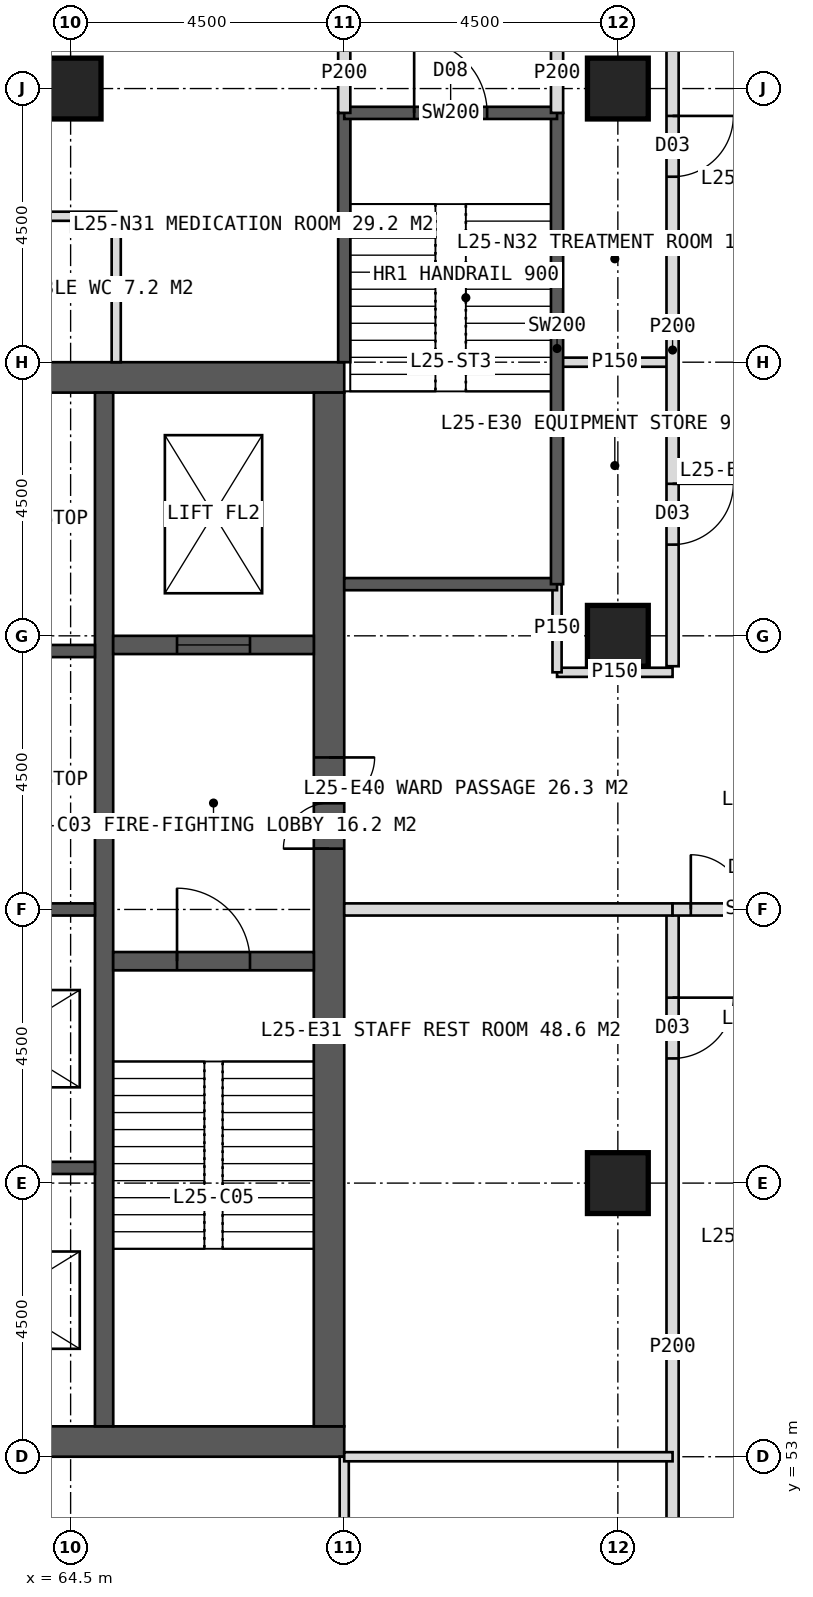
"""IFC4 building model, lengths in metres.
Left out: names, types, materials, properties, quantities, classifications, styles, units other than length and angle.
Written with IfcOpenShell. Run it as: python <this file> out.ifc"""

import sys

from ifc_helpers import new_model, si_unit, direction, frame, frame_2d, origin, origin_2d, place, context, subcontext, project, spatial, rectangle, hollow_rectangle, extrude, element, fill, save


model = new_model("IFC4")
c1 = context("Model", 3, precision=1e-05, world=origin(), true_north=direction((0.0, 1.0)))
c2 = subcontext(c1, "Body", "Model", "MODEL_VIEW")
j1 = project(units=[si_unit("LENGTHUNIT", "METRE"), si_unit("PLANEANGLEUNIT", "RADIAN")], contexts=[c1])
p1 = place(None, origin())
s1 = spatial("IfcSite", under=j1, at=p1, CompositionType="ELEMENT")
p2 = place(p1, origin())
s2 = spatial("IfcBuilding", under=s1, at=p2, CompositionType="ELEMENT")
p3 = place(p2, frame((0.0, 0.0, 108.0)))
s3 = spatial("IfcBuildingStorey", under=s2, at=p3, CompositionType="ELEMENT", Elevation=108.0)
p4 = place(p3, frame((51.0, 70.75, 0.0), z_axis=(0.0, 0.0, 1.0), x_axis=(1.0, 0.0, 0.0)))
e1 = element("IfcWall", 1, at=p4, inside=s3, PredefinedType="SHEAR", context=c2, shape_type="SweptSolid", body=[
    extrude(rectangle(XDim=18.0, YDim=0.5, at=frame_2d((9.0, 0.0))), origin(), (0.0, 0.0, 1.0), 4.0),
])
p5 = place(p4, frame((8.1, 0.0, 0.0)))
e2 = element("IfcOpeningElement", 2, at=p5, cuts=e1, PredefinedType="OPENING", context=c2, shape_type="SweptSolid", body=[
    extrude(rectangle(XDim=1.8, YDim=2.2, at=frame_2d((0.9, 1.1))), frame((0.0, 0.26, 0.0), z_axis=(0.0, -1.0, 0.0), x_axis=(1.0, 0.0, 0.0)), (0.0, 0.0, 1.0), 0.52),
])
p6 = place(p3, frame((51.0, 53.25, 0.0), z_axis=(0.0, 0.0, 1.0), x_axis=(1.0, 0.0, 0.0)))
e3 = element("IfcWall", 3, at=p6, inside=s3, PredefinedType="SHEAR", context=c2, shape_type="SweptSolid", body=[
    extrude(rectangle(XDim=18.0, YDim=0.5, at=frame_2d((9.0, 0.0))), origin(), (0.0, 0.0, 1.0), 4.0),
])
p7 = place(p6, frame((8.1, 0.0, 0.0)))
e4 = element("IfcOpeningElement", 4, at=p7, cuts=e3, PredefinedType="OPENING", context=c2, shape_type="SweptSolid", body=[
    extrude(rectangle(XDim=1.8, YDim=2.2, at=frame_2d((0.9, 1.1))), frame((0.0, 0.26, 0.0), z_axis=(0.0, -1.0, 0.0), x_axis=(1.0, 0.0, 0.0)), (0.0, 0.0, 1.0), 0.52),
])
p8 = place(p3, frame((68.75, 53.5, 0.0), z_axis=(0.0, 0.0, 1.0), x_axis=(0.0, 1.0, 0.0)))
e5 = element("IfcWall", 5, at=p8, inside=s3, PredefinedType="SHEAR", context=c2, shape_type="SweptSolid", body=[
    extrude(rectangle(XDim=17.0, YDim=0.5, at=frame_2d((8.5, 0.0))), origin(), (0.0, 0.0, 1.0), 4.0),
])
p9 = place(p8, frame((9.5, 0.0, 0.0)))
e6 = element("IfcOpeningElement", 6, at=p9, cuts=e5, PredefinedType="OPENING", context=c2, shape_type="SweptSolid", body=[
    extrude(rectangle(XDim=1.5, YDim=2.2, at=frame_2d((0.75, 1.1))), frame((0.0, 0.26, 0.0), z_axis=(0.0, -1.0, 0.0), x_axis=(1.0, 0.0, 0.0)), (0.0, 0.0, 1.0), 0.52),
])
p10 = place(p3, frame((65.05, 53.5, 0.0), z_axis=(0.0, 0.0, 1.0), x_axis=(0.0, 1.0, 0.0)))
e7 = element("IfcWall", 7, at=p10, inside=s3, PredefinedType="SHEAR", context=c2, shape_type="SweptSolid", body=[
    extrude(rectangle(XDim=17.0, YDim=0.3, at=frame_2d((8.5, 0.0))), origin(), (0.0, 0.0, 1.0), 4.0),
])
for number, where, z_axis, x_axis in (
    (8, (61.85, 57.75, 0.0), (0.0, 0.0, 1.0), (1.0, 0.0, 0.0)),
    (9, (61.85, 62.0, 0.0), (0.0, 0.0, 1.0), (1.0, 0.0, 0.0)),
    (10, (61.85, 66.25, 0.0), (0.0, 0.0, 1.0), (1.0, 0.0, 0.0)),
):
    element("IfcWall", number, at=place(p3, frame(where, z_axis=z_axis, x_axis=x_axis)), inside=s3, PredefinedType="SHEAR", context=c2, shape_type="SweptSolid", body=[
        extrude(rectangle(XDim=3.05, YDim=0.2, at=frame_2d((1.525, 0.0))), origin(), (0.0, 0.0, 1.0), 4.0),
    ])
p11 = place(p3, frame((65.2, 61.15, 0.0), z_axis=(0.0, 0.0, 1.0), x_axis=(1.0, 0.0, 0.0)))
e11 = element("IfcWall", 11, at=p11, inside=s3, PredefinedType="SHEAR", context=c2, shape_type="SweptSolid", body=[
    extrude(rectangle(XDim=3.3, YDim=0.3, at=frame_2d((1.65, 0.0))), origin(), (0.0, 0.0, 1.0), 4.0),
])
p12 = place(p11, frame((1.05, 0.0, 0.0)))
e12 = element("IfcOpeningElement", 12, at=p12, cuts=e11, PredefinedType="OPENING", context=c2, shape_type="SweptSolid", body=[
    extrude(rectangle(XDim=1.2, YDim=2.1, at=frame_2d((0.6, 1.05))), frame((0.0, 0.16, 0.0), z_axis=(0.0, -1.0, 0.0), x_axis=(1.0, 0.0, 0.0)), (0.0, 0.0, 1.0), 0.32),
])
p13 = place(p3, frame((65.2, 66.35, 0.0), z_axis=(0.0, 0.0, 1.0), x_axis=(1.0, 0.0, 0.0)))
e13 = element("IfcWall", 13, at=p13, inside=s3, PredefinedType="SHEAR", context=c2, shape_type="SweptSolid", body=[
    extrude(rectangle(XDim=3.3, YDim=0.3, at=frame_2d((1.65, 0.0))), origin(), (0.0, 0.0, 1.0), 4.0),
])
p14 = place(p13, frame((1.05, 0.0, 0.0)))
e14 = element("IfcOpeningElement", 14, at=p14, cuts=e13, PredefinedType="OPENING", context=c2, shape_type="SweptSolid", body=[
    extrude(rectangle(XDim=1.2, YDim=2.2, at=frame_2d((0.6, 1.1))), frame((0.0, 0.16, 0.0), z_axis=(0.0, -1.0, 0.0), x_axis=(1.0, 0.0, 0.0)), (0.0, 0.0, 1.0), 0.32),
])
for number, where, z_axis, x_axis in (
    (15, (73.5, 75.5, 0.0), (0.0, 0.0, 1.0), (1.0, 0.0, 0.0)),
    (16, (64.5, 75.5, 0.0), (0.0, 0.0, 1.0), (1.0, 0.0, 0.0)),
    (17, (73.5, 57.5, 0.0), (0.0, 0.0, 1.0), (1.0, 0.0, 0.0)),
    (18, (73.5, 66.5, 0.0), (0.0, 0.0, 1.0), (1.0, 0.0, 0.0)),
):
    element("IfcColumn", number, at=place(p3, frame(where, z_axis=z_axis, x_axis=x_axis)), inside=s3, PredefinedType="COLUMN", context=c2, shape_type="SweptSolid", body=[
        extrude(hollow_rectangle(XDim=1.0, YDim=1.0, WallThickness=0.1, at=origin_2d()), origin(), (0.0, 0.0, 1.0), 4.0),
    ])
p15 = place(p3, frame((62.25, 73.4, 0.0), z_axis=(0.0, 0.0, 1.0), x_axis=(1.0, 0.0, 0.0)))
e19 = element("IfcWall", 19, at=p15, inside=s3, PredefinedType="PARTITIONING", context=c2, shape_type="SweptSolid", body=[
    extrude(rectangle(XDim=3.0, YDim=0.15, at=frame_2d((1.5, 0.0))), origin(), (0.0, 0.0, 1.0), 3.75),
])
p16 = place(p3, frame((65.25, 71.0, 0.0), z_axis=(0.0, 0.0, 1.0), x_axis=(0.0, 1.0, 0.0)))
e20 = element("IfcWall", 20, at=p16, inside=s3, PredefinedType="PARTITIONING", context=c2, shape_type="SweptSolid", body=[
    extrude(rectangle(XDim=2.4, YDim=0.15, at=frame_2d((1.2, 0.0))), origin(), (0.0, 0.0, 1.0), 3.75),
])
p17 = place(p3, frame((69.0, 53.0, 0.0), z_axis=(0.0, 0.0, 1.0), x_axis=(0.0, -1.0, 0.0)))
e21 = element("IfcWall", 21, at=p17, inside=s3, PredefinedType="PARTITIONING", context=c2, shape_type="SweptSolid", body=[
    extrude(rectangle(XDim=5.4, YDim=0.15, at=frame_2d((2.7, 0.0))), origin(), (0.0, 0.0, 1.0), 3.75),
])
p18 = place(p3, frame((72.5, 71.0, 0.0), z_axis=(0.0, 0.0, 1.0), x_axis=(1.0, 0.0, 0.0)))
e22 = element("IfcWall", 22, at=p18, inside=s3, PredefinedType="PARTITIONING", context=c2, shape_type="SweptSolid", body=[
    extrude(rectangle(XDim=1.9, YDim=0.15, at=frame_2d((0.95, 0.0))), origin(), (0.0, 0.0, 1.0), 3.75),
])
p19 = place(p3, frame((74.4, 76.4, 0.0), z_axis=(0.0, 0.0, 1.0), x_axis=(0.0, -1.0, 0.0)))
e23 = element("IfcWall", 23, at=p19, inside=s3, PredefinedType="PARTITIONING", context=c2, shape_type="SweptSolid", body=[
    extrude(rectangle(XDim=10.4, YDim=0.2, at=frame_2d((5.2, 0.0))), origin(), (0.0, 0.0, 1.0), 3.75),
])
p20 = place(p19, frame((1.35, 0.0, 0.0)))
e24 = element("IfcOpeningElement", 24, at=p20, cuts=e23, PredefinedType="OPENING", context=c2, shape_type="SweptSolid", body=[
    extrude(rectangle(XDim=1.0, YDim=2.1, at=frame_2d((0.5, 1.05))), frame((0.0, 0.11, 0.0), z_axis=(0.0, -1.0, 0.0), x_axis=(1.0, 0.0, 0.0)), (0.0, 0.0, 1.0), 0.22),
])
p21 = place(p19, frame((7.4, 0.0, 0.0)))
e25 = element("IfcOpeningElement", 25, at=p21, cuts=e23, PredefinedType="OPENING", context=c2, shape_type="SweptSolid", body=[
    extrude(rectangle(XDim=1.0, YDim=2.1, at=frame_2d((0.5, 1.05))), frame((0.0, 0.11, 0.0), z_axis=(0.0, -1.0, 0.0), x_axis=(1.0, 0.0, 0.0)), (0.0, 0.0, 1.0), 0.22),
])
p22 = place(p3, frame((74.4, 62.0, 0.0), z_axis=(0.0, 0.0, 1.0), x_axis=(0.0, -1.0, 0.0)))
e26 = element("IfcWall", 26, at=p22, inside=s3, PredefinedType="PARTITIONING", context=c2, shape_type="SweptSolid", body=[
    extrude(rectangle(XDim=14.4, YDim=0.2, at=frame_2d((7.2, 0.0))), origin(), (0.0, 0.0, 1.0), 3.75),
])
p23 = place(p22, frame((1.45, 0.0, 0.0)))
e27 = element("IfcOpeningElement", 27, at=p23, cuts=e26, PredefinedType="OPENING", context=c2, shape_type="SweptSolid", body=[
    extrude(rectangle(XDim=1.0, YDim=2.1, at=frame_2d((0.5, 1.05))), frame((0.0, 0.11, 0.0), z_axis=(0.0, -1.0, 0.0), x_axis=(1.0, 0.0, 0.0)), (0.0, 0.0, 1.0), 0.22),
])
p24 = place(p22, frame((11.2, 0.0, 0.0)))
e28 = element("IfcOpeningElement", 28, at=p24, cuts=e26, PredefinedType="OPENING", context=c2, shape_type="SweptSolid", body=[
    extrude(rectangle(XDim=1.0, YDim=2.1, at=frame_2d((0.5, 1.05))), frame((0.0, 0.11, 0.0), z_axis=(0.0, -1.0, 0.0), x_axis=(1.0, 0.0, 0.0)), (0.0, 0.0, 1.0), 0.22),
])
p25 = place(p3, frame((72.5, 65.9, 0.0), z_axis=(0.0, 0.0, 1.0), x_axis=(1.0, 0.0, 0.0)))
e29 = element("IfcWall", 29, at=p25, inside=s3, PredefinedType="PARTITIONING", context=c2, shape_type="SweptSolid", body=[
    extrude(rectangle(XDim=1.9, YDim=0.15, at=frame_2d((0.95, 0.0))), origin(), (0.0, 0.0, 1.0), 3.75),
])
p26 = place(p3, frame((69.0, 62.0, 0.0), z_axis=(0.0, 0.0, 1.0), x_axis=(1.0, 0.0, 0.0)))
e30 = element("IfcWall", 30, at=p26, inside=s3, PredefinedType="SOLIDWALL", context=c2, shape_type="SweptSolid", body=[
    extrude(rectangle(XDim=5.4, YDim=0.2, at=frame_2d((2.7, 0.0))), origin(), (0.0, 0.0, 1.0), 2.95),
])
p27 = place(p3, frame((69.0, 53.0, 0.0), z_axis=(0.0, 0.0, 1.0), x_axis=(1.0, 0.0, 0.0)))
e31 = element("IfcWall", 31, at=p27, inside=s3, PredefinedType="PARTITIONING", context=c2, shape_type="SweptSolid", body=[
    extrude(rectangle(XDim=5.4, YDim=0.15, at=frame_2d((2.7, 0.0))), origin(), (0.0, 0.0, 1.0), 3.75),
])
p28 = place(p3, frame((74.4, 62.0, 0.0), z_axis=(0.0, 0.0, 1.0), x_axis=(1.0, 0.0, 0.0)))
e32 = element("IfcWall", 32, at=p28, inside=s3, PredefinedType="SOLIDWALL", context=c2, shape_type="SweptSolid", body=[
    extrude(rectangle(XDim=2.7, YDim=0.2, at=frame_2d((1.35, 0.0))), origin(), (0.0, 0.0, 1.0), 2.95),
])
p29 = place(p28, frame((0.3, 0.0, 0.0)))
e33 = element("IfcOpeningElement", 33, at=p29, cuts=e32, PredefinedType="OPENING", context=c2, shape_type="SweptSolid", body=[
    extrude(rectangle(XDim=1.8, YDim=2.2, at=frame_2d((0.9, 1.1))), frame((0.0, 0.11, 0.0), z_axis=(0.0, -1.0, 0.0), x_axis=(1.0, 0.0, 0.0)), (0.0, 0.0, 1.0), 0.22),
])
p30 = place(p3, frame((72.5, 65.9, 0.0), z_axis=(0.0, 0.0, 1.0), x_axis=(0.0, 1.0, 0.0)))
e34 = element("IfcWall", 34, at=p30, inside=s3, PredefinedType="PARTITIONING", context=c2, shape_type="SweptSolid", body=[
    extrude(rectangle(XDim=1.45, YDim=0.15, at=frame_2d((0.725, 0.0))), origin(), (0.0, 0.0, 1.0), 3.75),
])
p31 = place(p3, frame((69.0, 71.0, 0.0), z_axis=(0.0, 0.0, 1.0), x_axis=(0.0, 1.0, 0.0)))
e35 = element("IfcWall", 35, at=p31, inside=s3, PredefinedType="SOLIDWALL", context=c2, shape_type="SweptSolid", body=[
    extrude(rectangle(XDim=4.1, YDim=0.2, at=frame_2d((2.05, 0.0))), origin(), (0.0, 0.0, 1.0), 3.75),
])
p32 = place(p3, frame((69.0, 67.35, 0.0), z_axis=(0.0, 0.0, 1.0), x_axis=(1.0, 0.0, 0.0)))
e36 = element("IfcWall", 36, at=p32, inside=s3, PredefinedType="SOLIDWALL", context=c2, shape_type="SweptSolid", body=[
    extrude(rectangle(XDim=3.5, YDim=0.2, at=frame_2d((1.75, 0.0))), origin(), (0.0, 0.0, 1.0), 3.75),
])
p33 = place(p3, frame((72.5, 67.35, 0.0), z_axis=(0.0, 0.0, 1.0), x_axis=(0.0, 1.0, 0.0)))
e37 = element("IfcWall", 37, at=p33, inside=s3, PredefinedType="SOLIDWALL", context=c2, shape_type="SweptSolid", body=[
    extrude(rectangle(XDim=7.75, YDim=0.2, at=frame_2d((3.875, 0.0))), origin(), (0.0, 0.0, 1.0), 3.75),
])
p34 = place(p3, frame((69.0, 75.1, 0.0), z_axis=(0.0, 0.0, 1.0), x_axis=(1.0, 0.0, 0.0)))
e38 = element("IfcWall", 38, at=p34, inside=s3, PredefinedType="SOLIDWALL", context=c2, shape_type="SweptSolid", body=[
    extrude(rectangle(XDim=3.5, YDim=0.2, at=frame_2d((1.75, 0.0))), origin(), (0.0, 0.0, 1.0), 3.75),
])
p35 = place(p34, frame((1.15, 0.0, 0.0)))
e39 = element("IfcOpeningElement", 39, at=p35, cuts=e38, PredefinedType="OPENING", context=c2, shape_type="SweptSolid", body=[
    extrude(rectangle(XDim=1.2, YDim=2.1, at=frame_2d((0.6, 1.05))), frame((0.0, 0.11, 0.0), z_axis=(0.0, -1.0, 0.0), x_axis=(1.0, 0.0, 0.0)), (0.0, 0.0, 1.0), 0.22),
])
for number, where, z_axis, x_axis in (
    (40, (69.0, 75.1, 0.0), (0.0, 0.0, 1.0), (0.0, 1.0, 0.0)),
    (41, (72.5, 75.1, 0.0), (0.0, 0.0, 1.0), (0.0, 1.0, 0.0)),
):
    element("IfcWall", number, at=place(p3, frame(where, z_axis=z_axis, x_axis=x_axis)), inside=s3, PredefinedType="PARTITIONING", context=c2, shape_type="SweptSolid", body=[
        extrude(rectangle(XDim=1.3, YDim=0.2, at=frame_2d((0.65, 0.0))), origin(), (0.0, 0.0, 1.0), 3.75),
    ])
p36 = place(p20, origin())
e42 = element("IfcDoor", 42, at=p36, inside=s3, OperationType="SINGLE_SWING_LEFT", PredefinedType="DOOR", context=c2, shape_type="SweptSolid", body=[
    extrude(rectangle(XDim=1.0, YDim=2.1, at=frame_2d((0.5, 1.05))), frame((0.0, 0.025, 0.0), z_axis=(0.0, -1.0, 0.0), x_axis=(1.0, 0.0, 0.0)), (0.0, 0.0, 1.0), 0.05),
])
fill(e24, e42)
p37 = place(p21, origin())
e43 = element("IfcDoor", 43, at=p37, inside=s3, OperationType="SINGLE_SWING_LEFT", PredefinedType="DOOR", context=c2, shape_type="SweptSolid", body=[
    extrude(rectangle(XDim=1.0, YDim=2.1, at=frame_2d((0.5, 1.05))), frame((0.0, 0.025, 0.0), z_axis=(0.0, -1.0, 0.0), x_axis=(1.0, 0.0, 0.0)), (0.0, 0.0, 1.0), 0.05),
])
fill(e25, e43)
p38 = place(p23, origin())
e44 = element("IfcDoor", 44, at=p38, inside=s3, OperationType="SINGLE_SWING_LEFT", PredefinedType="DOOR", context=c2, shape_type="SweptSolid", body=[
    extrude(rectangle(XDim=1.0, YDim=2.1, at=frame_2d((0.5, 1.05))), frame((0.0, 0.025, 0.0), z_axis=(0.0, -1.0, 0.0), x_axis=(1.0, 0.0, 0.0)), (0.0, 0.0, 1.0), 0.05),
])
fill(e27, e44)
p39 = place(p29, origin())
e45 = element("IfcDoor", 45, at=p39, inside=s3, OperationType="DOUBLE_DOOR_DOUBLE_SWING", PredefinedType="DOOR", context=c2, shape_type="SweptSolid", body=[
    extrude(rectangle(XDim=1.8, YDim=2.2, at=frame_2d((0.9, 1.1))), frame((0.0, 0.025, 0.0), z_axis=(0.0, -1.0, 0.0), x_axis=(1.0, 0.0, 0.0)), (0.0, 0.0, 1.0), 0.05),
])
fill(e33, e45)
p40 = place(p9, origin())
e46 = element("IfcDoor", 46, at=p40, inside=s3, OperationType="DOUBLE_DOOR_SINGLE_SWING", PredefinedType="DOOR", context=c2, shape_type="SweptSolid", body=[
    extrude(rectangle(XDim=1.5, YDim=2.2, at=frame_2d((0.75, 1.1))), frame((0.0, 0.025, 0.0), z_axis=(0.0, -1.0, 0.0), x_axis=(1.0, 0.0, 0.0)), (0.0, 0.0, 1.0), 0.05),
])
fill(e6, e46)
p41 = place(p12, origin())
e47 = element("IfcDoor", 47, at=p41, inside=s3, OperationType="SINGLE_SWING_LEFT", PredefinedType="DOOR", context=c2, shape_type="SweptSolid", body=[
    extrude(rectangle(XDim=1.2, YDim=2.1, at=frame_2d((0.6, 1.05))), frame((0.0, 0.025, 0.0), z_axis=(0.0, -1.0, 0.0), x_axis=(1.0, 0.0, 0.0)), (0.0, 0.0, 1.0), 0.05),
])
fill(e12, e47)
p42 = place(p14, origin())
e48 = element("IfcDoor", 48, at=p42, inside=s3, OperationType="SLIDING_TO_LEFT", PredefinedType="DOOR", context=c2, shape_type="SweptSolid", body=[
    extrude(rectangle(XDim=1.2, YDim=2.2, at=frame_2d((0.6, 1.1))), frame((0.0, 0.025, 0.0), z_axis=(0.0, -1.0, 0.0), x_axis=(1.0, 0.0, 0.0)), (0.0, 0.0, 1.0), 0.05),
])
fill(e14, e48)
p43 = place(p35, origin())
e49 = element("IfcDoor", 49, at=p43, inside=s3, OperationType="SINGLE_SWING_LEFT", PredefinedType="DOOR", context=c2, shape_type="SweptSolid", body=[
    extrude(rectangle(XDim=1.2, YDim=2.1, at=frame_2d((0.6, 1.05))), frame((0.0, 0.025, 0.0), z_axis=(0.0, -1.0, 0.0), x_axis=(1.0, 0.0, 0.0)), (0.0, 0.0, 1.0), 0.05),
])
fill(e39, e49)
save(model, sys.argv[1])
